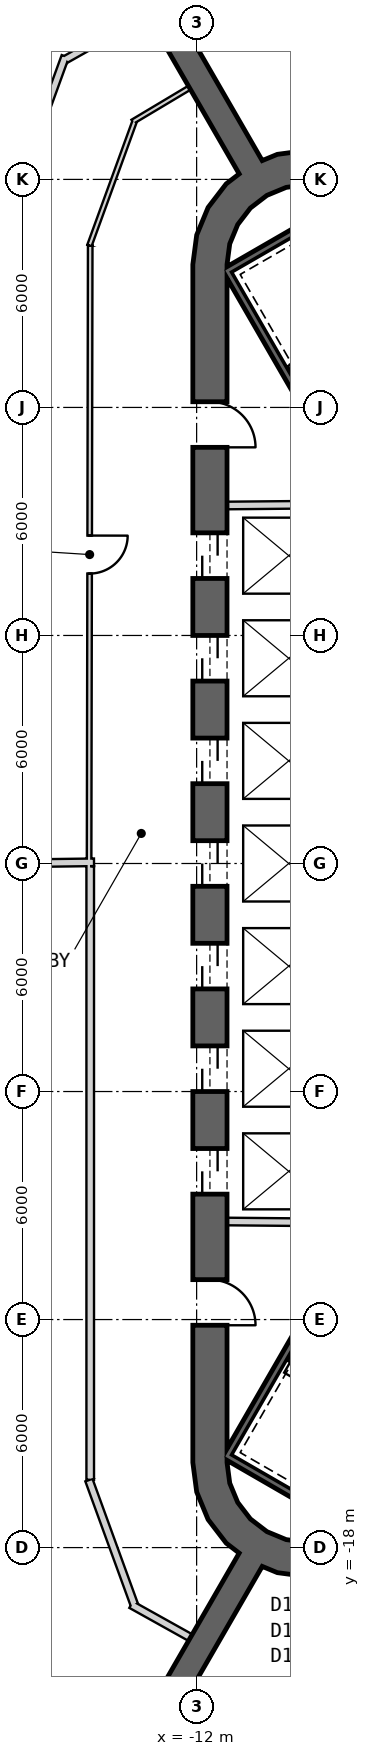
"""IFC4 building model, lengths in metres.
Left out: names, types, materials, properties, quantities, classifications, styles, units other than length and angle.
Written with IfcOpenShell. Run it as: python <this file> out.ifc"""

import sys

from ifc_helpers import new_model, si_unit, direction, frame, frame_2d, origin, place, context, subcontext, project, spatial, polyline, rectangle, outline, extrude, element, fill, save


model = new_model("IFC4")
c1 = context("Model", 3, precision=1e-05, world=origin(), true_north=direction((0.0, 1.0)))
c2 = subcontext(c1, "Body", "Model", "MODEL_VIEW")
j1 = project(units=[si_unit("LENGTHUNIT", "METRE"), si_unit("PLANEANGLEUNIT", "RADIAN")], contexts=[c1])
p1 = place(None, origin())
s1 = spatial("IfcSite", under=j1, at=p1, CompositionType="ELEMENT")
p2 = place(p1, origin())
s2 = spatial("IfcBuilding", under=s1, at=p2, CompositionType="ELEMENT")
p3 = place(p2, frame((0.0, 0.0, 253.2)))
s3 = spatial("IfcBuildingStorey", under=s2, at=p3, CompositionType="ELEMENT", Elevation=253.2)
p4 = place(p3, frame((-11.65, 15.762, 0.0), z_axis=(0.0, 0.0, 1.0), x_axis=(0.0, -1.0, 0.0)))
e1 = element("IfcWall", 1, at=p4, inside=s3, PredefinedType="SHEAR", context=c2, shape_type="SweptSolid", body=[
    extrude(rectangle(XDim=31.523, YDim=0.9, at=frame_2d((15.762, 0.0))), origin(), (0.0, 0.0, 1.0), 4.0),
])
p5 = place(p4, frame((7.062, 0.0, 0.0)))
e2 = element("IfcOpeningElement", 2, at=p5, cuts=e1, PredefinedType="OPENING", context=c2, shape_type="SweptSolid", body=[
    extrude(rectangle(XDim=1.2, YDim=2.4, at=frame_2d((0.6, 1.2))), frame((0.0, 0.46, 0.0), z_axis=(0.0, -1.0, 0.0), x_axis=(1.0, 0.0, 0.0)), (0.0, 0.0, 1.0), 0.92),
])
p6 = place(p4, frame((9.762, 0.0, 0.0)))
e3 = element("IfcOpeningElement", 3, at=p6, cuts=e1, PredefinedType="OPENING", context=c2, shape_type="SweptSolid", body=[
    extrude(rectangle(XDim=1.2, YDim=2.4, at=frame_2d((0.6, 1.2))), frame((0.0, 0.46, 0.0), z_axis=(0.0, -1.0, 0.0), x_axis=(1.0, 0.0, 0.0)), (0.0, 0.0, 1.0), 0.92),
])
p7 = place(p4, frame((12.462, 0.0, 0.0)))
e4 = element("IfcOpeningElement", 4, at=p7, cuts=e1, PredefinedType="OPENING", context=c2, shape_type="SweptSolid", body=[
    extrude(rectangle(XDim=1.2, YDim=2.4, at=frame_2d((0.6, 1.2))), frame((0.0, 0.46, 0.0), z_axis=(0.0, -1.0, 0.0), x_axis=(1.0, 0.0, 0.0)), (0.0, 0.0, 1.0), 0.92),
])
p8 = place(p4, frame((15.162, 0.0, 0.0)))
e5 = element("IfcOpeningElement", 5, at=p8, cuts=e1, PredefinedType="OPENING", context=c2, shape_type="SweptSolid", body=[
    extrude(rectangle(XDim=1.2, YDim=2.4, at=frame_2d((0.6, 1.2))), frame((0.0, 0.46, 0.0), z_axis=(0.0, -1.0, 0.0), x_axis=(1.0, 0.0, 0.0)), (0.0, 0.0, 1.0), 0.92),
])
p9 = place(p4, frame((17.862, 0.0, 0.0)))
e6 = element("IfcOpeningElement", 6, at=p9, cuts=e1, PredefinedType="OPENING", context=c2, shape_type="SweptSolid", body=[
    extrude(rectangle(XDim=1.2, YDim=2.4, at=frame_2d((0.6, 1.2))), frame((0.0, 0.46, 0.0), z_axis=(0.0, -1.0, 0.0), x_axis=(1.0, 0.0, 0.0)), (0.0, 0.0, 1.0), 0.92),
])
p10 = place(p4, frame((20.562, 0.0, 0.0)))
e7 = element("IfcOpeningElement", 7, at=p10, cuts=e1, PredefinedType="OPENING", context=c2, shape_type="SweptSolid", body=[
    extrude(rectangle(XDim=1.2, YDim=2.4, at=frame_2d((0.6, 1.2))), frame((0.0, 0.46, 0.0), z_axis=(0.0, -1.0, 0.0), x_axis=(1.0, 0.0, 0.0)), (0.0, 0.0, 1.0), 0.92),
])
p11 = place(p4, frame((23.262, 0.0, 0.0)))
e8 = element("IfcOpeningElement", 8, at=p11, cuts=e1, PredefinedType="OPENING", context=c2, shape_type="SweptSolid", body=[
    extrude(rectangle(XDim=1.2, YDim=2.4, at=frame_2d((0.6, 1.2))), frame((0.0, 0.46, 0.0), z_axis=(0.0, -1.0, 0.0), x_axis=(1.0, 0.0, 0.0)), (0.0, 0.0, 1.0), 0.92),
])
p12 = place(p4, frame((3.612, 0.0, 0.0)))
e9 = element("IfcOpeningElement", 9, at=p12, cuts=e1, PredefinedType="OPENING", context=c2, shape_type="SweptSolid", body=[
    extrude(rectangle(XDim=1.2, YDim=2.4, at=frame_2d((0.6, 1.2))), frame((0.0, 0.46, 0.0), z_axis=(0.0, -1.0, 0.0), x_axis=(1.0, 0.0, 0.0)), (0.0, 0.0, 1.0), 0.92),
])
p13 = place(p4, frame((26.712, 0.0, 0.0)))
e10 = element("IfcOpeningElement", 10, at=p13, cuts=e1, PredefinedType="OPENING", context=c2, shape_type="SweptSolid", body=[
    extrude(rectangle(XDim=1.2, YDim=2.4, at=frame_2d((0.6, 1.2))), frame((0.0, 0.46, 0.0), z_axis=(0.0, -1.0, 0.0), x_axis=(1.0, 0.0, 0.0)), (0.0, 0.0, 1.0), 0.92),
])
p14 = place(p3, origin())
e11 = element("IfcWall", 11, at=p14, inside=s3, PredefinedType="SHEAR", context=c2, shape_type="SweptSolid", body=[
    extrude(outline(polyline([(-7.6, 18.36), (-8.323, 18.659), (-9.1, 18.762), (-9.876, 18.659), (-10.6, 18.36), (-11.221, 17.883), (-11.698, 17.262), (-11.998, 16.538), (-12.1, 15.762), (-11.2, 15.762), (-11.128, 16.305), (-10.919, 16.812), (-10.585, 17.247), (-10.15, 17.58), (-9.644, 17.79), (-9.1, 17.862), (-8.556, 17.79), (-8.05, 17.58), (-7.6, 18.36)])), origin(), (0.0, 0.0, 1.0), 4.0),
])
p15 = place(p3, origin())
e12 = element("IfcWall", 12, at=p15, inside=s3, PredefinedType="SHEAR", context=c2, shape_type="SweptSolid", body=[
    extrude(outline(polyline([(-12.1, -15.762), (-11.998, -16.538), (-11.698, -17.262), (-11.221, -17.883), (-10.6, -18.36), (-9.876, -18.659), (-9.1, -18.762), (-8.323, -18.659), (-7.6, -18.36), (-8.05, -17.58), (-8.556, -17.79), (-9.1, -17.862), (-9.644, -17.79), (-10.15, -17.58), (-10.585, -17.247), (-10.919, -16.812), (-11.128, -16.305), (-11.2, -15.762), (-12.1, -15.762)])), origin(), (0.0, 0.0, 1.0), 4.0),
])
for number, where, z_axis, x_axis in (
    (13, (-10.575, 18.316, 0.0), (0.0, 0.0, 1.0), (-0.5, 0.866, 0.0)),
    (14, (-10.575, -18.316, 0.0), (0.0, 0.0, 1.0), (-0.5, -0.866, 0.0)),
):
    element("IfcWall", number, at=place(p3, frame(where, z_axis=z_axis, x_axis=x_axis)), inside=s3, PredefinedType="SHEAR", context=c2, shape_type="SweptSolid", body=[
        extrude(rectangle(XDim=10.432, YDim=0.7, at=frame_2d((5.216, 0.0))), origin(), (0.0, 0.0, 1.0), 4.0),
    ])
p16 = place(p3, frame((-11.2, 9.42, 0.0), z_axis=(0.0, 0.0, 1.0), x_axis=(0.999957167047, 0.009255488683, 0.0)))
e15 = element("IfcWall", 15, at=p16, inside=s3, PredefinedType="PLUMBINGWALL", context=c2, shape_type="SweptSolid", body=[
    extrude(rectangle(XDim=3.35, YDim=0.2, at=frame_2d((1.675, 0.0))), origin(), (0.0, 0.0, 1.0), 3.7),
])
p17 = place(p3, frame((-8.05, -9.449, 0.0), z_axis=(0.0, 0.0, 1.0), x_axis=(-0.999957467379, 0.009222983926, 0.0)))
e16 = element("IfcWall", 16, at=p17, inside=s3, PredefinedType="PLUMBINGWALL", context=c2, shape_type="SweptSolid", body=[
    extrude(rectangle(XDim=3.15, YDim=0.2, at=frame_2d((1.575, 0.0))), origin(), (0.0, 0.0, 1.0), 3.7),
])
p18 = place(p3, frame((-11.245, 15.678, -0.3), z_axis=(0.0, 0.0, 1.0), x_axis=(0.499977274689, -0.866038523851, 0.0)))
e17 = element("IfcWall", 17, at=p18, inside=s3, PredefinedType="SHEAR", context=c2, shape_type="SweptSolid", body=[
    extrude(rectangle(XDim=8.1, YDim=0.2, at=frame_2d((4.05, 0.0))), origin(), (0.0, 0.0, 1.0), 4.0),
])
for number, where, z_axis, x_axis in (
    (18, (-7.818, 17.541, -0.3), (0.0, 0.0, 1.0), (-0.866, -0.5, 0.0)),
    (19, (-11.282, -15.541, -0.3), (0.0, 0.0, 1.0), (0.866, -0.5, 0.0)),
):
    element("IfcWall", number, at=place(p3, frame(where, z_axis=z_axis, x_axis=x_axis)), inside=s3, PredefinedType="SHEAR", context=c2, shape_type="SweptSolid", body=[
        extrude(rectangle(XDim=3.8, YDim=0.2, at=frame_2d((1.9, 0.0))), origin(), (0.0, 0.0, 1.0), 4.0),
    ])
p19 = place(p3, frame((-7.196, -8.663, -0.3), z_axis=(0.0, 0.0, 1.0), x_axis=(-0.499997992926, -0.866026562566, 0.0)))
e20 = element("IfcWall", 20, at=p19, inside=s3, PredefinedType="SHEAR", context=c2, shape_type="SweptSolid", body=[
    extrude(rectangle(XDim=7.9, YDim=0.2, at=frame_2d((3.95, 0.0))), origin(), (0.0, 0.0, 1.0), 4.0),
])
p20 = place(p3, frame((-12.189, 20.411, 0.0), z_axis=(0.0, 0.0, 1.0), x_axis=(-0.858492721014, -0.51282574815, 0.0)))
e21 = element("IfcWall", 21, at=p20, inside=s3, PredefinedType="PARTITIONING", context=c2, shape_type="SweptSolid", body=[
    extrude(rectangle(XDim=1.742, YDim=0.12, at=frame_2d((0.871, 0.0))), origin(), (0.0, 0.0, 1.0), 3.7),
])
p21 = place(p3, frame((-13.631, 19.53, 0.0), z_axis=(0.0, 0.0, 1.0), x_axis=(-0.342069878069, -0.939674517329, 0.0)))
e22 = element("IfcWall", 22, at=p21, inside=s3, PredefinedType="PARTITIONING", context=c2, shape_type="SweptSolid", body=[
    extrude(rectangle(XDim=3.479, YDim=0.12, at=frame_2d((1.739, 0.0))), origin(), (0.0, 0.0, 1.0), 2.88),
])
p22 = place(p3, frame((-14.8, 16.257, 0.0), z_axis=(0.0, 0.0, 1.0), x_axis=(-0.001847148781, -0.999998294019, 0.0)))
e23 = element("IfcWall", 23, at=p22, inside=s3, PredefinedType="PARTITIONING", context=c2, shape_type="SweptSolid", body=[
    extrude(rectangle(XDim=16.257, YDim=0.12, at=frame_2d((8.128, 0.0))), origin(), (0.0, 0.0, 1.0), 2.98),
])
p23 = place(p22, frame((7.629, 0.0, 0.0)))
e24 = element("IfcOpeningElement", 24, at=p23, cuts=e23, PredefinedType="OPENING", context=c2, shape_type="SweptSolid", body=[
    extrude(rectangle(XDim=1.0, YDim=2.1, at=frame_2d((0.5, 1.05))), frame((0.0, 0.07, 0.0), z_axis=(0.0, -1.0, 0.0), x_axis=(1.0, 0.0, 0.0)), (0.0, 0.0, 1.0), 0.14),
])
p24 = place(p3, frame((-17.2, -0.001, 0.0), z_axis=(0.0, 0.0, 1.0), x_axis=(0.999915662945, 0.012987185857, 0.0)))
e25 = element("IfcWall", 25, at=p24, inside=s3, PredefinedType="PARTITIONING", context=c2, shape_type="SweptSolid", body=[
    extrude(rectangle(XDim=2.5, YDim=0.2, at=frame_2d((1.25, 0.0))), origin(), (0.0, 0.0, 1.0), 3.07),
])
p25 = place(p3, frame((-15.456, 21.239, 0.0), z_axis=(0.0, 0.0, 1.0), x_axis=(-0.34205546997, -0.939679762187, 0.0)))
e26 = element("IfcWall", 26, at=p25, inside=s3, PredefinedType="PARTITIONING", context=c2, shape_type="SweptSolid", body=[
    extrude(rectangle(XDim=4.706, YDim=0.2, at=frame_2d((2.353, 0.0))), origin(), (0.0, 0.0, 1.0), 2.88),
])
p26 = place(p3, frame((-13.313, 22.359, 0.0), z_axis=(0.0, 0.0, 1.0), x_axis=(-0.87121710687, -0.490897904555, 0.0)))
e27 = element("IfcWall", 27, at=p26, inside=s3, PredefinedType="PARTITIONING", context=c2, shape_type="SweptSolid", body=[
    extrude(rectangle(XDim=2.457, YDim=0.2, at=frame_2d((1.229, 0.0))), origin(), (0.0, 0.0, 1.0), 3.7),
])
p27 = place(p3, frame((-13.722, -19.499, 0.0), z_axis=(0.0, 0.0, 1.0), x_axis=(0.873381780332, -0.487036205824, 0.0)))
e28 = element("IfcWall", 28, at=p27, inside=s3, PredefinedType="PARTITIONING", context=c2, shape_type="SweptSolid", body=[
    extrude(rectangle(XDim=1.785, YDim=0.2, at=frame_2d((0.892, 0.0))), origin(), (0.0, 0.0, 1.0), 3.7),
])
p28 = place(p3, frame((-14.834, -16.223, 0.0), z_axis=(0.0, 0.0, 1.0), x_axis=(0.342017717312, -0.939693503779, 0.0)))
e29 = element("IfcWall", 29, at=p28, inside=s3, PredefinedType="PARTITIONING", context=c2, shape_type="SweptSolid", body=[
    extrude(rectangle(XDim=3.497, YDim=0.2, at=frame_2d((1.749, 0.0))), origin(), (0.0, 0.0, 1.0), 2.88),
])
p29 = place(p3, frame((-14.8, -0.07, 0.0), z_axis=(0.0, 0.0, 1.0), x_axis=(0.0, -1.0, 0.0)))
e30 = element("IfcWall", 30, at=p29, inside=s3, PredefinedType="PARTITIONING", context=c2, shape_type="SweptSolid", body=[
    extrude(rectangle(XDim=16.147, YDim=0.2, at=frame_2d((8.073, 0.0))), origin(), (0.0, 0.0, 1.0), 2.98),
])
p30 = place(p23, origin())
e31 = element("IfcDoor", 31, at=p30, inside=s3, OperationType="SINGLE_SWING_LEFT", PredefinedType="NOTDEFINED", context=c2, shape_type="SweptSolid", body=[
    extrude(rectangle(XDim=1.0, YDim=2.1, at=frame_2d((0.5, 1.05))), frame((0.0, 0.025, 0.0), z_axis=(0.0, -1.0, 0.0), x_axis=(1.0, 0.0, 0.0)), (0.0, 0.0, 1.0), 0.05),
])
fill(e24, e31)
p31 = place(p5, origin())
e32 = element("IfcDoor", 32, at=p31, inside=s3, OperationType="SLIDING_TO_LEFT", PredefinedType="USERDEFINED", context=c2, shape_type="SweptSolid", body=[
    extrude(rectangle(XDim=1.2, YDim=2.4, at=frame_2d((0.6, 1.2))), frame((0.0, 0.025, 0.0), z_axis=(0.0, -1.0, 0.0), x_axis=(1.0, 0.0, 0.0)), (0.0, 0.0, 1.0), 0.05),
])
fill(e2, e32)
p32 = place(p6, origin())
e33 = element("IfcDoor", 33, at=p32, inside=s3, OperationType="SLIDING_TO_LEFT", PredefinedType="USERDEFINED", context=c2, shape_type="SweptSolid", body=[
    extrude(rectangle(XDim=1.2, YDim=2.4, at=frame_2d((0.6, 1.2))), frame((0.0, 0.025, 0.0), z_axis=(0.0, -1.0, 0.0), x_axis=(1.0, 0.0, 0.0)), (0.0, 0.0, 1.0), 0.05),
])
fill(e3, e33)
p33 = place(p7, origin())
e34 = element("IfcDoor", 34, at=p33, inside=s3, OperationType="SLIDING_TO_LEFT", PredefinedType="USERDEFINED", context=c2, shape_type="SweptSolid", body=[
    extrude(rectangle(XDim=1.2, YDim=2.4, at=frame_2d((0.6, 1.2))), frame((0.0, 0.025, 0.0), z_axis=(0.0, -1.0, 0.0), x_axis=(1.0, 0.0, 0.0)), (0.0, 0.0, 1.0), 0.05),
])
fill(e4, e34)
p34 = place(p8, origin())
e35 = element("IfcDoor", 35, at=p34, inside=s3, OperationType="SLIDING_TO_LEFT", PredefinedType="USERDEFINED", context=c2, shape_type="SweptSolid", body=[
    extrude(rectangle(XDim=1.2, YDim=2.4, at=frame_2d((0.6, 1.2))), frame((0.0, 0.025, 0.0), z_axis=(0.0, -1.0, 0.0), x_axis=(1.0, 0.0, 0.0)), (0.0, 0.0, 1.0), 0.05),
])
fill(e5, e35)
p35 = place(p9, origin())
e36 = element("IfcDoor", 36, at=p35, inside=s3, OperationType="SLIDING_TO_LEFT", PredefinedType="USERDEFINED", context=c2, shape_type="SweptSolid", body=[
    extrude(rectangle(XDim=1.2, YDim=2.4, at=frame_2d((0.6, 1.2))), frame((0.0, 0.025, 0.0), z_axis=(0.0, -1.0, 0.0), x_axis=(1.0, 0.0, 0.0)), (0.0, 0.0, 1.0), 0.05),
])
fill(e6, e36)
p36 = place(p10, origin())
e37 = element("IfcDoor", 37, at=p36, inside=s3, OperationType="SLIDING_TO_LEFT", PredefinedType="USERDEFINED", context=c2, shape_type="SweptSolid", body=[
    extrude(rectangle(XDim=1.2, YDim=2.4, at=frame_2d((0.6, 1.2))), frame((0.0, 0.025, 0.0), z_axis=(0.0, -1.0, 0.0), x_axis=(1.0, 0.0, 0.0)), (0.0, 0.0, 1.0), 0.05),
])
fill(e7, e37)
p37 = place(p11, origin())
e38 = element("IfcDoor", 38, at=p37, inside=s3, OperationType="SLIDING_TO_LEFT", PredefinedType="USERDEFINED", context=c2, shape_type="SweptSolid", body=[
    extrude(rectangle(XDim=1.2, YDim=2.4, at=frame_2d((0.6, 1.2))), frame((0.0, 0.025, 0.0), z_axis=(0.0, -1.0, 0.0), x_axis=(1.0, 0.0, 0.0)), (0.0, 0.0, 1.0), 0.05),
])
fill(e8, e38)
p38 = place(p12, origin())
e39 = element("IfcDoor", 39, at=p38, inside=s3, OperationType="SINGLE_SWING_LEFT", PredefinedType="USERDEFINED", context=c2, shape_type="SweptSolid", body=[
    extrude(rectangle(XDim=1.2, YDim=2.4, at=frame_2d((0.6, 1.2))), frame((0.0, 0.025, 0.0), z_axis=(0.0, -1.0, 0.0), x_axis=(1.0, 0.0, 0.0)), (0.0, 0.0, 1.0), 0.05),
])
fill(e9, e39)
p39 = place(p13, origin())
e40 = element("IfcDoor", 40, at=p39, inside=s3, OperationType="SINGLE_SWING_RIGHT", PredefinedType="USERDEFINED", context=c2, shape_type="SweptSolid", body=[
    extrude(rectangle(XDim=1.2, YDim=2.4, at=frame_2d((0.6, 1.2))), frame((0.0, 0.025, 0.0), z_axis=(0.0, -1.0, 0.0), x_axis=(1.0, 0.0, 0.0)), (0.0, 0.0, 1.0), 0.05),
])
fill(e10, e40)
save(model, sys.argv[1])
